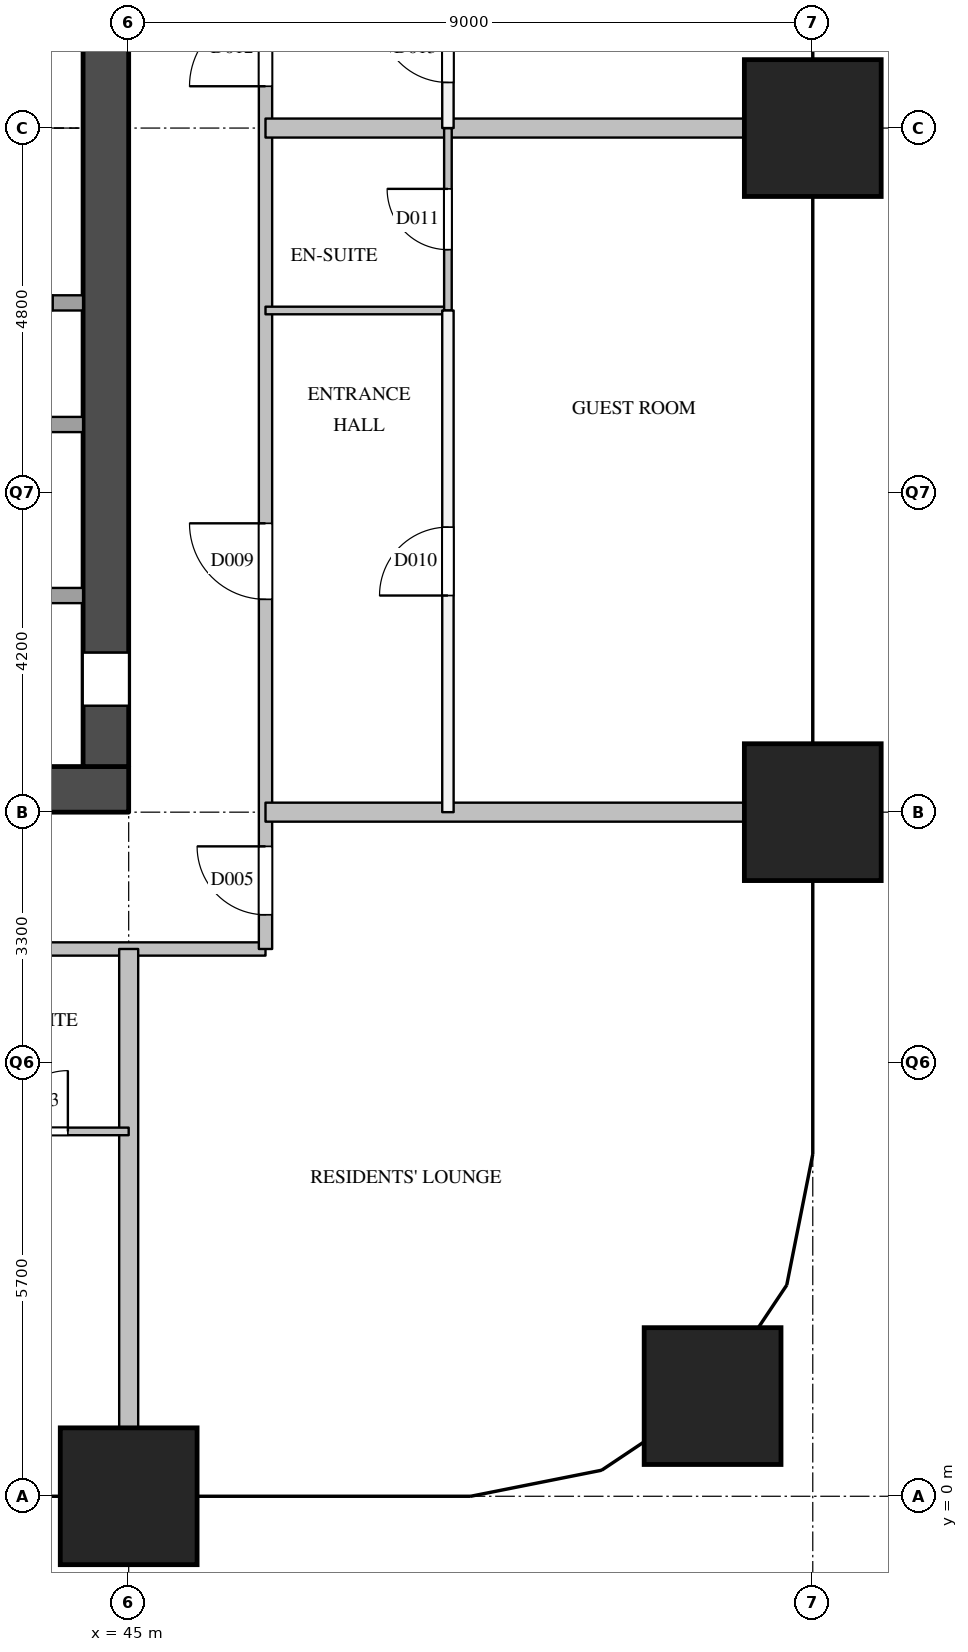
"""IFC4 building model, lengths in metres.
Left out: names, types, materials, properties, quantities, classifications, styles, units other than length and angle.
Written with IfcOpenShell. Run it as: python <this file> out.ifc"""

import sys

from ifc_helpers import new_model, si_unit, direction, frame, frame_2d, origin, origin_2d, place, context, subcontext, project, spatial, rectangle, extrude, element, fill, save


model = new_model("IFC4")
c1 = context("Model", 3, precision=1e-05, world=origin(), true_north=direction((0.0, 1.0)))
c2 = subcontext(c1, "Body", "Model", "MODEL_VIEW")
j1 = project(units=[si_unit("LENGTHUNIT", "METRE"), si_unit("PLANEANGLEUNIT", "RADIAN")], contexts=[c1])
p1 = place(None, origin())
s1 = spatial("IfcSite", under=j1, at=p1, CompositionType="ELEMENT")
p2 = place(p1, origin())
s2 = spatial("IfcBuilding", under=s1, at=p2, CompositionType="ELEMENT")
p3 = place(p2, frame((0.0, 0.0, 104.4)))
s3 = spatial("IfcBuildingStorey", under=s2, at=p3, CompositionType="ELEMENT", Elevation=104.4)
for number, where, z_axis, x_axis in (
    (1, (45.0, 0.0, 0.0), (0.0, 0.0, 1.0), (1.0, 0.0, 0.0)),
    (2, (52.682, 1.318, 0.0), (0.0, 0.0, 1.0), (1.0, 0.0, 0.0)),
    (3, (54.0, 9.0, 0.0), (0.0, 0.0, 1.0), (1.0, 0.0, 0.0)),
    (4, (54.0, 18.0, 0.0), (0.0, 0.0, 1.0), (1.0, 0.0, 0.0)),
):
    element("IfcColumn", number, at=place(p3, frame(where, z_axis=z_axis, x_axis=x_axis)), inside=s3, PredefinedType="COLUMN", context=c2, shape_type="SweptSolid", body=[
        extrude(rectangle(XDim=1.8, YDim=1.8, at=origin_2d()), origin(), (0.0, 0.0, 1.0), 3.8),
    ])
p4 = place(p3, frame((36.0, 9.3, 0.0), z_axis=(0.0, 0.0, 1.0), x_axis=(1.0, 0.0, 0.0)))
e5 = element("IfcWall", 5, at=p4, inside=s3, PredefinedType="SHEAR", context=c2, shape_type="SweptSolid", body=[
    extrude(rectangle(XDim=9.0, YDim=0.6, at=frame_2d((4.5, 0.0))), origin(), (0.0, 0.0, 1.0), 3.5),
])
p5 = place(p3, frame((44.7, 9.6, 0.0), z_axis=(0.0, 0.0, 1.0), x_axis=(0.0, 1.0, 0.0)))
e6 = element("IfcWall", 6, at=p5, inside=s3, PredefinedType="SHEAR", context=c2, shape_type="SweptSolid", body=[
    extrude(rectangle(XDim=12.3, YDim=0.6, at=frame_2d((6.15, 0.0))), origin(), (0.0, 0.0, 1.0), 3.5),
])
p6 = place(p5, frame((0.8, 0.0, 0.0)))
e7 = element("IfcOpeningElement", 7, at=p6, cuts=e6, PredefinedType="OPENING", context=c2, shape_type="SweptSolid", body=[
    extrude(rectangle(XDim=0.7, YDim=2.1, at=frame_2d((0.35, 1.05))), frame((0.0, 0.31, 0.0), z_axis=(0.0, -1.0, 0.0), x_axis=(1.0, 0.0, 0.0)), (0.0, 0.0, 1.0), 0.62),
])
p7 = place(p3, frame((36.6, 11.85, 0.0), z_axis=(0.0, 0.0, 1.0), x_axis=(1.0, 0.0, 0.0)))
e8 = element("IfcWall", 8, at=p7, inside=s3, PredefinedType="SOLIDWALL", context=c2, shape_type="SweptSolid", body=[
    extrude(rectangle(XDim=7.8, YDim=0.2, at=frame_2d((3.9, 0.0))), origin(), (0.0, 0.0, 1.0), 3.5),
])
p8 = place(p3, frame((42.6, 14.1, 0.0), z_axis=(0.0, 0.0, 1.0), x_axis=(1.0, 0.0, 0.0)))
e9 = element("IfcWall", 9, at=p8, inside=s3, PredefinedType="SOLIDWALL", context=c2, shape_type="SweptSolid", body=[
    extrude(rectangle(XDim=1.8, YDim=0.2, at=frame_2d((0.9, 0.0))), origin(), (0.0, 0.0, 1.0), 3.5),
])
p9 = place(p8, frame((0.55, 0.0, 0.0)))
e10 = element("IfcOpeningElement", 10, at=p9, cuts=e9, PredefinedType="OPENING", context=c2, shape_type="SweptSolid", body=[
    extrude(rectangle(XDim=0.7, YDim=2.1, at=frame_2d((0.35, 1.05))), frame((0.0, 0.11, 0.0), z_axis=(0.0, -1.0, 0.0), x_axis=(1.0, 0.0, 0.0)), (0.0, 0.0, 1.0), 0.22),
])
p10 = place(p3, frame((42.9, 15.7, 0.0), z_axis=(0.0, 0.0, 1.0), x_axis=(1.0, 0.0, 0.0)))
e11 = element("IfcWall", 11, at=p10, inside=s3, PredefinedType="SOLIDWALL", context=c2, shape_type="SweptSolid", body=[
    extrude(rectangle(XDim=1.5, YDim=0.2, at=frame_2d((0.75, 0.0))), origin(), (0.0, 0.0, 1.0), 3.5),
])
p11 = place(p10, frame((0.4, 0.0, 0.0)))
e12 = element("IfcOpeningElement", 12, at=p11, cuts=e11, PredefinedType="OPENING", context=c2, shape_type="SweptSolid", body=[
    extrude(rectangle(XDim=0.7, YDim=2.1, at=frame_2d((0.35, 1.05))), frame((0.0, 0.11, 0.0), z_axis=(0.0, -1.0, 0.0), x_axis=(1.0, 0.0, 0.0)), (0.0, 0.0, 1.0), 0.22),
])
p12 = place(p3, frame((34.2, 7.2, 0.0), z_axis=(0.0, 0.0, 1.0), x_axis=(1.0, 0.0, 0.0)))
e13 = element("IfcWall", 13, at=p12, inside=s3, PredefinedType="PARTITIONING", context=c2, shape_type="SweptSolid", body=[
    extrude(rectangle(XDim=12.6, YDim=0.175, at=frame_2d((6.3, 0.0))), origin(), (0.0, 0.0, 1.0), 3.5),
])
p13 = place(p12, frame((4.6, 0.0, 0.0)))
e14 = element("IfcOpeningElement", 14, at=p13, cuts=e13, PredefinedType="OPENING", context=c2, shape_type="SweptSolid", body=[
    extrude(rectangle(XDim=1.0, YDim=2.1, at=frame_2d((0.5, 1.05))), frame((0.0, 0.097, 0.0), z_axis=(0.0, -1.0, 0.0), x_axis=(1.0, 0.0, 0.0)), (0.0, 0.0, 1.0), 0.195),
])
p14 = place(p3, frame((46.8, 7.2, 0.0), z_axis=(0.0, 0.0, 1.0), x_axis=(0.0, 1.0, 0.0)))
e15 = element("IfcWall", 15, at=p14, inside=s3, PredefinedType="PARTITIONING", context=c2, shape_type="SweptSolid", body=[
    extrude(rectangle(XDim=16.49, YDim=0.175, at=frame_2d((8.245, 0.0))), origin(), (0.0, 0.0, 1.0), 3.5),
])
p15 = place(p14, frame((0.45, 0.0, 0.0)))
e16 = element("IfcOpeningElement", 16, at=p15, cuts=e15, PredefinedType="OPENING", context=c2, shape_type="SweptSolid", body=[
    extrude(rectangle(XDim=0.9, YDim=2.1, at=frame_2d((0.45, 1.05))), frame((0.0, 0.097, 0.0), z_axis=(0.0, -1.0, 0.0), x_axis=(1.0, 0.0, 0.0)), (0.0, 0.0, 1.0), 0.195),
])
p16 = place(p14, frame((4.6, 0.0, 0.0)))
e17 = element("IfcOpeningElement", 17, at=p16, cuts=e15, PredefinedType="OPENING", context=c2, shape_type="SweptSolid", body=[
    extrude(rectangle(XDim=1.0, YDim=2.1, at=frame_2d((0.5, 1.05))), frame((0.0, 0.097, 0.0), z_axis=(0.0, -1.0, 0.0), x_axis=(1.0, 0.0, 0.0)), (0.0, 0.0, 1.0), 0.195),
])
p17 = place(p14, frame((11.35, 0.0, 0.0)))
e18 = element("IfcOpeningElement", 18, at=p17, cuts=e15, PredefinedType="OPENING", context=c2, shape_type="SweptSolid", body=[
    extrude(rectangle(XDim=1.0, YDim=2.1, at=frame_2d((0.5, 1.05))), frame((0.0, 0.097, 0.0), z_axis=(0.0, -1.0, 0.0), x_axis=(1.0, 0.0, 0.0)), (0.0, 0.0, 1.0), 0.195),
])
p18 = place(p3, frame((49.2, 9.0, 0.0), z_axis=(0.0, 0.0, 1.0), x_axis=(0.0, 1.0, 0.0)))
e19 = element("IfcWall", 19, at=p18, inside=s3, PredefinedType="PARTITIONING", context=c2, shape_type="SweptSolid", body=[
    extrude(rectangle(XDim=6.6, YDim=0.15, at=frame_2d((3.3, 0.0))), origin(), (0.0, 0.0, 1.0), 3.5),
])
p19 = place(p18, frame((2.85, 0.0, 0.0)))
e20 = element("IfcOpeningElement", 20, at=p19, cuts=e19, PredefinedType="OPENING", context=c2, shape_type="SweptSolid", body=[
    extrude(rectangle(XDim=0.9, YDim=2.1, at=frame_2d((0.45, 1.05))), frame((0.0, 0.085, 0.0), z_axis=(0.0, -1.0, 0.0), x_axis=(1.0, 0.0, 0.0)), (0.0, 0.0, 1.0), 0.17),
])
p20 = place(p3, frame((49.2, 18.0, 0.0), z_axis=(0.0, 0.0, 1.0), x_axis=(0.0, 1.0, 0.0)))
e21 = element("IfcWall", 21, at=p20, inside=s3, PredefinedType="PARTITIONING", context=c2, shape_type="SweptSolid", body=[
    extrude(rectangle(XDim=2.1, YDim=0.15, at=frame_2d((1.05, 0.0))), origin(), (0.0, 0.0, 1.0), 3.5),
])
p21 = place(p20, frame((0.6, 0.0, 0.0)))
e22 = element("IfcOpeningElement", 22, at=p21, cuts=e21, PredefinedType="OPENING", context=c2, shape_type="SweptSolid", body=[
    extrude(rectangle(XDim=0.9, YDim=2.1, at=frame_2d((0.45, 1.05))), frame((0.0, 0.085, 0.0), z_axis=(0.0, -1.0, 0.0), x_axis=(1.0, 0.0, 0.0)), (0.0, 0.0, 1.0), 0.17),
])
for number, where, z_axis, x_axis in (
    (23, (46.8, 9.0, 0.0), (0.0, 0.0, 1.0), (1.0, 0.0, 0.0)),
    (24, (46.8, 18.0, 0.0), (0.0, 0.0, 1.0), (1.0, 0.0, 0.0)),
    (25, (45.0, 0.0, 0.0), (0.0, 0.0, 1.0), (0.0, 1.0, 0.0)),
):
    element("IfcWall", number, at=place(p3, frame(where, z_axis=z_axis, x_axis=x_axis)), inside=s3, PredefinedType="PARTITIONING", context=c2, shape_type="SweptSolid", body=[
        extrude(rectangle(XDim=7.2, YDim=0.25, at=frame_2d((3.6, 0.0))), origin(), (0.0, 0.0, 1.0), 3.5),
    ])
p22 = place(p3, frame((42.6, 4.8, 0.0), z_axis=(0.0, 0.0, 1.0), x_axis=(1.0, 0.0, 0.0)))
e26 = element("IfcWall", 26, at=p22, inside=s3, PredefinedType="PARTITIONING", context=c2, shape_type="SweptSolid", body=[
    extrude(rectangle(XDim=2.4, YDim=0.1, at=frame_2d((1.2, 0.0))), origin(), (0.0, 0.0, 1.0), 3.5),
])
p23 = place(p22, frame((0.8, 0.0, 0.0)))
e27 = element("IfcOpeningElement", 27, at=p23, cuts=e26, PredefinedType="OPENING", context=c2, shape_type="SweptSolid", body=[
    extrude(rectangle(XDim=0.8, YDim=2.1, at=frame_2d((0.4, 1.05))), frame((0.0, 0.06, 0.0), z_axis=(0.0, -1.0, 0.0), x_axis=(1.0, 0.0, 0.0)), (0.0, 0.0, 1.0), 0.12),
])
p24 = place(p3, frame((46.8, 15.6, 0.0), z_axis=(0.0, 0.0, 1.0), x_axis=(1.0, 0.0, 0.0)))
e28 = element("IfcWall", 28, at=p24, inside=s3, PredefinedType="PARTITIONING", context=c2, shape_type="SweptSolid", body=[
    extrude(rectangle(XDim=2.4, YDim=0.1, at=frame_2d((1.2, 0.0))), origin(), (0.0, 0.0, 1.0), 3.5),
])
p25 = place(p3, frame((49.2, 15.6, 0.0), z_axis=(0.0, 0.0, 1.0), x_axis=(0.0, 1.0, 0.0)))
e29 = element("IfcWall", 29, at=p25, inside=s3, PredefinedType="PARTITIONING", context=c2, shape_type="SweptSolid", body=[
    extrude(rectangle(XDim=2.4, YDim=0.1, at=frame_2d((1.2, 0.0))), origin(), (0.0, 0.0, 1.0), 3.5),
])
p26 = place(p25, frame((0.8, 0.0, 0.0)))
e30 = element("IfcOpeningElement", 30, at=p26, cuts=e29, PredefinedType="OPENING", context=c2, shape_type="SweptSolid", body=[
    extrude(rectangle(XDim=0.8, YDim=2.1, at=frame_2d((0.4, 1.05))), frame((0.0, 0.06, 0.0), z_axis=(0.0, -1.0, 0.0), x_axis=(1.0, 0.0, 0.0)), (0.0, 0.0, 1.0), 0.12),
])
p27 = place(p6, origin())
e31 = element("IfcDoor", 31, at=p27, inside=s3, OperationType="SINGLE_SWING_LEFT", PredefinedType="DOOR", context=c2, shape_type="SweptSolid", body=[
    extrude(rectangle(XDim=0.7, YDim=2.1, at=frame_2d((0.35, 1.05))), frame((0.0, 0.025, 0.0), z_axis=(0.0, -1.0, 0.0), x_axis=(1.0, 0.0, 0.0)), (0.0, 0.0, 1.0), 0.05),
])
fill(e7, e31)
p28 = place(p23, origin())
e32 = element("IfcDoor", 32, at=p28, inside=s3, OperationType="SINGLE_SWING_RIGHT", PredefinedType="DOOR", context=c2, shape_type="SweptSolid", body=[
    extrude(rectangle(XDim=0.8, YDim=2.1, at=frame_2d((0.4, 1.05))), frame((0.0, 0.025, 0.0), z_axis=(0.0, -1.0, 0.0), x_axis=(1.0, 0.0, 0.0)), (0.0, 0.0, 1.0), 0.05),
])
fill(e27, e32)
p29 = place(p15, origin())
e33 = element("IfcDoor", 33, at=p29, inside=s3, OperationType="SINGLE_SWING_RIGHT", PredefinedType="DOOR", context=c2, shape_type="SweptSolid", body=[
    extrude(rectangle(XDim=0.9, YDim=2.1, at=frame_2d((0.45, 1.05))), frame((0.0, 0.025, 0.0), z_axis=(0.0, -1.0, 0.0), x_axis=(1.0, 0.0, 0.0)), (0.0, 0.0, 1.0), 0.05),
])
fill(e16, e33)
p30 = place(p16, origin())
e34 = element("IfcDoor", 34, at=p30, inside=s3, OperationType="SINGLE_SWING_RIGHT", PredefinedType="DOOR", context=c2, shape_type="SweptSolid", body=[
    extrude(rectangle(XDim=1.0, YDim=2.1, at=frame_2d((0.5, 1.05))), frame((0.0, 0.025, 0.0), z_axis=(0.0, -1.0, 0.0), x_axis=(1.0, 0.0, 0.0)), (0.0, 0.0, 1.0), 0.05),
])
fill(e17, e34)
p31 = place(p19, origin())
e35 = element("IfcDoor", 35, at=p31, inside=s3, OperationType="SINGLE_SWING_LEFT", PredefinedType="DOOR", context=c2, shape_type="SweptSolid", body=[
    extrude(rectangle(XDim=0.9, YDim=2.1, at=frame_2d((0.45, 1.05))), frame((0.0, 0.025, 0.0), z_axis=(0.0, -1.0, 0.0), x_axis=(1.0, 0.0, 0.0)), (0.0, 0.0, 1.0), 0.05),
])
fill(e20, e35)
p32 = place(p26, origin())
e36 = element("IfcDoor", 36, at=p32, inside=s3, OperationType="SINGLE_SWING_RIGHT", PredefinedType="DOOR", context=c2, shape_type="SweptSolid", body=[
    extrude(rectangle(XDim=0.8, YDim=2.1, at=frame_2d((0.4, 1.05))), frame((0.0, 0.025, 0.0), z_axis=(0.0, -1.0, 0.0), x_axis=(1.0, 0.0, 0.0)), (0.0, 0.0, 1.0), 0.05),
])
fill(e30, e36)
p33 = place(p17, origin())
e37 = element("IfcDoor", 37, at=p33, inside=s3, OperationType="SINGLE_SWING_LEFT", PredefinedType="DOOR", context=c2, shape_type="SweptSolid", body=[
    extrude(rectangle(XDim=1.0, YDim=2.1, at=frame_2d((0.5, 1.05))), frame((0.0, 0.025, 0.0), z_axis=(0.0, -1.0, 0.0), x_axis=(1.0, 0.0, 0.0)), (0.0, 0.0, 1.0), 0.05),
])
fill(e18, e37)
p34 = place(p21, origin())
e38 = element("IfcDoor", 38, at=p34, inside=s3, OperationType="SINGLE_SWING_RIGHT", PredefinedType="DOOR", context=c2, shape_type="SweptSolid", body=[
    extrude(rectangle(XDim=0.9, YDim=2.1, at=frame_2d((0.45, 1.05))), frame((0.0, 0.025, 0.0), z_axis=(0.0, -1.0, 0.0), x_axis=(1.0, 0.0, 0.0)), (0.0, 0.0, 1.0), 0.05),
])
fill(e22, e38)
save(model, sys.argv[1])
